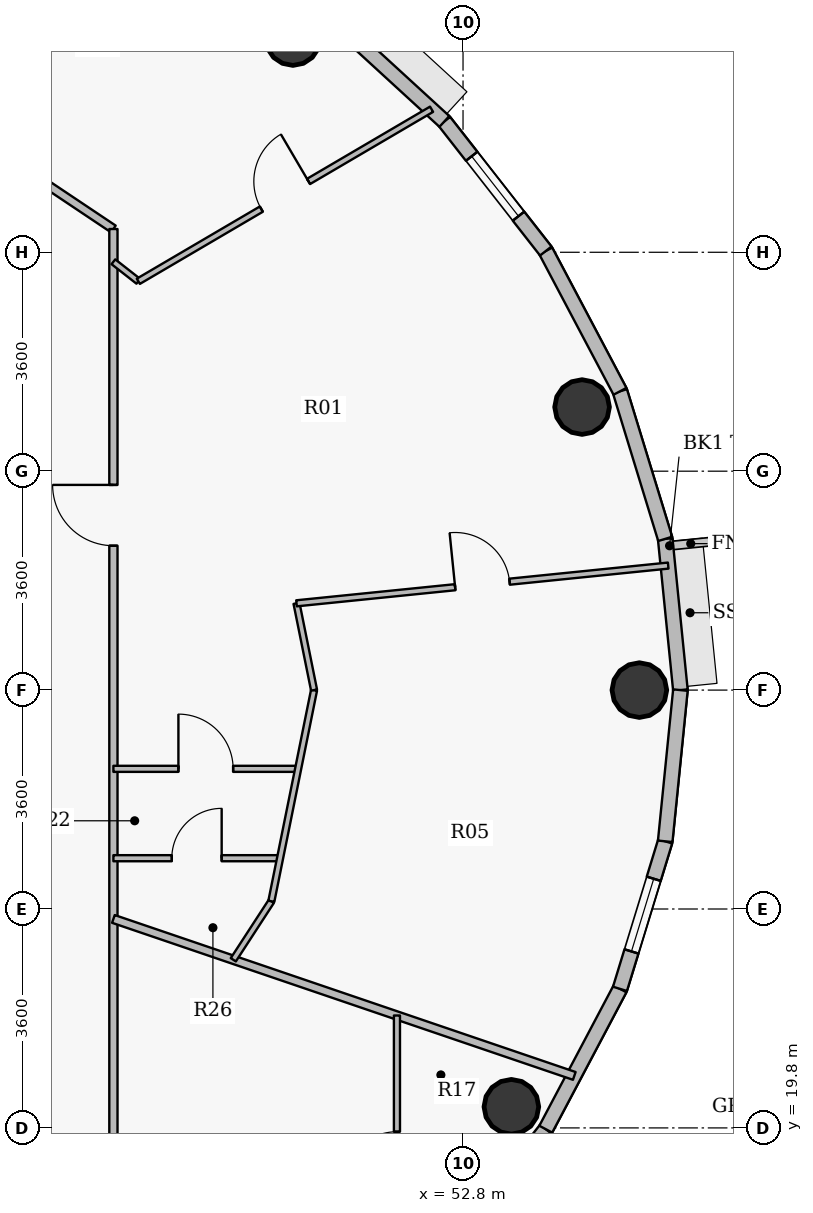
"""IFC4 building model, lengths in metres.
Left out: names, types, materials, properties, quantities, classifications, styles, units other than length and angle.
Written with IfcOpenShell. Run it as: python <this file> out.ifc"""

import sys

from ifc_helpers import new_model, si_unit, direction, frame, frame_2d, origin, origin_2d, place, context, subcontext, project, spatial, rectangle, hollow_circle, extrude, source, transform, mapped, element, fill, save


model = new_model("IFC4")
c1 = context("Model", 3, precision=1e-05, world=origin(), true_north=direction((0.0, 1.0)))
c2 = subcontext(c1, "Body", "Model", "MODEL_VIEW")
j1 = project(units=[si_unit("LENGTHUNIT", "METRE"), si_unit("PLANEANGLEUNIT", "RADIAN")], contexts=[c1])
p1 = place(None, origin())
s1 = spatial("IfcSite", under=j1, at=p1, CompositionType="ELEMENT")
p2 = place(p1, origin())
s2 = spatial("IfcBuilding", under=s1, at=p2, CompositionType="ELEMENT")
p3 = place(p2, frame((0.0, 0.0, 335.4)))
s3 = spatial("IfcBuildingStorey", under=s2, at=p3, CompositionType="ELEMENT", Elevation=335.4)
for number, where, z_axis, x_axis in (
    (1, (55.7, 27.0, 0.0), (0.0, 0.0, 1.0), (1.0, 0.0, 0.0)),
    (2, (54.758, 31.655, 0.0), (0.0, 0.0, 1.0), (1.0, 0.0, 0.0)),
    (3, (50.002, 37.723, 0.0), (0.0, 0.0, 1.0), (1.0, 0.0, 0.0)),
    (4, (53.595, 20.147, 0.0), (0.0, 0.0, 1.0), (1.0, 0.0, 0.0)),
):
    element("IfcColumn", number, at=place(p3, frame(where, z_axis=z_axis, x_axis=x_axis)), inside=s3, PredefinedType="COLUMN", context=c2, shape_type="SweptSolid", body=[
        extrude(hollow_circle(Radius=0.45, WallThickness=0.028, at=origin_2d()), origin(), (0.0, 0.0, 1.0), 3.8),
    ])
p4 = place(p3, frame((56.125, 29.487, 0.0), z_axis=(0.0, 0.0, 1.0), x_axis=(0.100025963401, -0.994984827344, 0.0)))
e5 = element("IfcWall", 5, at=p4, inside=s3, PredefinedType="SOLIDWALL", context=c2, shape_type="SweptSolid", body=[
    extrude(rectangle(XDim=2.499, YDim=0.24, at=frame_2d((1.25, 0.0))), origin(), (0.0, 0.0, 1.0), 3.55),
])
p5 = place(p3, frame((55.381, 31.913, 0.0), z_axis=(0.0, 0.0, 1.0), x_axis=(0.293105547213, -0.956080089842, 0.0)))
e6 = element("IfcWall", 6, at=p5, inside=s3, PredefinedType="SOLIDWALL", context=c2, shape_type="SweptSolid", body=[
    extrude(rectangle(XDim=2.538, YDim=0.24, at=frame_2d((1.269, 0.0))), origin(), (0.0, 0.0, 1.0), 2.035),
])
p6 = place(p3, frame((54.161, 34.221, 0.0), z_axis=(0.0, 0.0, 1.0), x_axis=(0.467487999989, -0.883999417345, 0.0)))
e7 = element("IfcWall", 7, at=p6, inside=s3, PredefinedType="SOLIDWALL", context=c2, shape_type="SweptSolid", body=[
    extrude(rectangle(XDim=2.61, YDim=0.24, at=frame_2d((1.305, 0.0))), origin(), (0.0, 0.0, 1.0), 2.035),
])
p7 = place(p3, frame((52.493, 36.352, 0.0), z_axis=(0.0, 0.0, 1.0), x_axis=(0.616286367698, -0.78752213492, 0.0)))
e8 = element("IfcWall", 8, at=p7, inside=s3, PredefinedType="SOLIDWALL", context=c2, shape_type="SweptSolid", body=[
    extrude(rectangle(XDim=2.706, YDim=0.24, at=frame_2d((1.353, 0.0))), origin(), (0.0, 0.0, 1.0), 3.55),
])
p8 = place(p7, frame((0.728, 0.0, 0.9)))
e9 = element("IfcOpeningElement", 9, at=p8, cuts=e8, PredefinedType="OPENING", context=c2, shape_type="SweptSolid", body=[
    extrude(rectangle(XDim=1.25, YDim=1.65, at=origin_2d()), frame((0.625, 0.13, 0.825), z_axis=(0.0, -1.0, 0.0), x_axis=(1.0, 0.0, 0.0)), (0.0, 0.0, 1.0), 0.26),
])
p9 = place(p3, frame((50.419, 38.254, 0.0), z_axis=(0.0, 0.0, 1.0), x_axis=(0.737020907932, -0.675869944051, 0.0)))
e10 = element("IfcWall", 10, at=p9, inside=s3, PredefinedType="SOLIDWALL", context=c2, shape_type="SweptSolid", body=[
    extrude(rectangle(XDim=2.815, YDim=0.24, at=frame_2d((1.407, 0.0))), origin(), (0.0, 0.0, 1.0), 3.55),
])
p10 = place(p3, frame((54.161, 19.779, 0.0), z_axis=(0.0, 0.0, 1.0), x_axis=(-0.616286367698, -0.78752213492, 0.0)))
e11 = element("IfcWall", 11, at=p10, inside=s3, PredefinedType="SOLIDWALL", context=c2, shape_type="SweptSolid", body=[
    extrude(rectangle(XDim=2.706, YDim=0.24, at=frame_2d((1.353, 0.0))), origin(), (0.0, 0.0, 1.0), 2.035),
])
p11 = place(p3, frame((55.381, 22.087, 0.0), z_axis=(0.0, 0.0, 1.0), x_axis=(-0.467487999989, -0.883999417345, 0.0)))
e12 = element("IfcWall", 12, at=p11, inside=s3, PredefinedType="SOLIDWALL", context=c2, shape_type="SweptSolid", body=[
    extrude(rectangle(XDim=2.61, YDim=0.24, at=frame_2d((1.305, 0.0))), origin(), (0.0, 0.0, 1.0), 2.035),
])
p12 = place(p3, frame((56.125, 24.513, 0.0), z_axis=(0.0, 0.0, 1.0), x_axis=(-0.293105547213, -0.956080089842, 0.0)))
e13 = element("IfcWall", 13, at=p12, inside=s3, PredefinedType="SOLIDWALL", context=c2, shape_type="SweptSolid", body=[
    extrude(rectangle(XDim=2.538, YDim=0.24, at=frame_2d((1.269, 0.0))), origin(), (0.0, 0.0, 1.0), 3.55),
])
p13 = place(p12, frame((0.644, 0.0, 0.9)))
e14 = element("IfcOpeningElement", 14, at=p13, cuts=e13, PredefinedType="OPENING", context=c2, shape_type="SweptSolid", body=[
    extrude(rectangle(XDim=1.25, YDim=1.65, at=origin_2d()), frame((0.625, 0.13, 0.825), z_axis=(0.0, -1.0, 0.0), x_axis=(1.0, 0.0, 0.0)), (0.0, 0.0, 1.0), 0.26),
])
p14 = place(p3, frame((56.375, 27.0, 0.0), z_axis=(0.0, 0.0, 1.0), x_axis=(-0.100025963401, -0.994984827344, 0.0)))
e15 = element("IfcWall", 15, at=p14, inside=s3, PredefinedType="SOLIDWALL", context=c2, shape_type="SweptSolid", body=[
    extrude(rectangle(XDim=2.499, YDim=0.24, at=frame_2d((1.25, 0.0))), origin(), (0.0, 0.0, 1.0), 3.55),
])
p15 = place(p3, frame((45.541, 35.592, 0.0), z_axis=(0.0, 0.0, 1.0), x_axis=(0.831180227396, -0.556003084151, 0.0)))
e16 = element("IfcWall", 16, at=p15, inside=s3, PredefinedType="PARTITIONING", context=c2, shape_type="SweptSolid", body=[
    extrude(rectangle(XDim=1.815, YDim=0.135, at=frame_2d((0.908, 0.0))), origin(), (0.0, 0.0, 1.0), 3.085),
])
p16 = place(p3, frame((47.05, 19.417, 0.0), z_axis=(0.0, 0.0, 1.0), x_axis=(0.0, 1.0, 0.0)))
e17 = element("IfcWall", 17, at=p16, inside=s3, PredefinedType="PARTITIONING", context=c2, shape_type="SweptSolid", body=[
    extrude(rectangle(XDim=15.165, YDim=0.135, at=frame_2d((7.583, 0.0))), origin(), (0.0, 0.0, 1.0), 2.25),
])
p17 = place(p16, frame((9.957, 0.0, 0.0)))
e18 = element("IfcOpeningElement", 18, at=p17, cuts=e17, PredefinedType="OPENING", context=c2, shape_type="SweptSolid", body=[
    extrude(rectangle(XDim=1.0, YDim=2.15, at=origin_2d()), frame((0.5, 0.078, 1.075), z_axis=(0.0, -1.0, 0.0), x_axis=(1.0, 0.0, 0.0)), (0.0, 0.0, 1.0), 0.155),
])
p18 = place(p3, frame((47.05, 23.237, 0.0), z_axis=(0.0, 0.0, 1.0), x_axis=(0.946614475353, -0.32236785673, 0.0)))
e19 = element("IfcWall", 19, at=p18, inside=s3, PredefinedType="PARTITIONING", context=c2, shape_type="SweptSolid", body=[
    extrude(rectangle(XDim=8.007, YDim=0.135, at=frame_2d((4.004, 0.0))), origin(), (0.0, 0.0, 1.0), 3.035),
])
p19 = place(p3, frame((47.05, 24.235, 0.0), z_axis=(0.0, 0.0, 1.0), x_axis=(1.0, 0.0, 0.0)))
e20 = element("IfcWall", 20, at=p19, inside=s3, PredefinedType="PARTITIONING", context=c2, shape_type="SweptSolid", body=[
    extrude(rectangle(XDim=2.741, YDim=0.1, at=frame_2d((1.37, 0.0))), origin(), (0.0, 0.0, 1.0), 3.55),
])
p20 = place(p19, frame((0.96, 0.0, 0.0)))
e21 = element("IfcOpeningElement", 21, at=p20, cuts=e20, PredefinedType="OPENING", context=c2, shape_type="SweptSolid", body=[
    extrude(rectangle(XDim=0.82, YDim=2.1, at=origin_2d()), frame((0.41, 0.06, 1.05), z_axis=(0.0, -1.0, 0.0), x_axis=(1.0, 0.0, 0.0)), (0.0, 0.0, 1.0), 0.12),
])
p21 = place(p3, frame((47.05, 25.705, 0.0), z_axis=(0.0, 0.0, 1.0), x_axis=(1.0, 0.0, 0.0)))
e22 = element("IfcWall", 22, at=p21, inside=s3, PredefinedType="PARTITIONING", context=c2, shape_type="SweptSolid", body=[
    extrude(rectangle(XDim=3.038, YDim=0.1, at=frame_2d((1.519, 0.0))), origin(), (0.0, 0.0, 1.0), 3.55),
])
p22 = place(p21, frame((1.069, 0.0, 0.0)))
e23 = element("IfcOpeningElement", 23, at=p22, cuts=e22, PredefinedType="OPENING", context=c2, shape_type="SweptSolid", body=[
    extrude(rectangle(XDim=0.9, YDim=2.1, at=origin_2d()), frame((0.45, 0.06, 1.05), z_axis=(0.0, -1.0, 0.0), x_axis=(1.0, 0.0, 0.0)), (0.0, 0.0, 1.0), 0.12),
])
p23 = place(p3, frame((47.05, 34.044, 0.0), z_axis=(0.0, 0.0, 1.0), x_axis=(0.787277370311, -0.616599012483, 0.0)))
e24 = element("IfcWall", 24, at=p23, inside=s3, PredefinedType="PARTITIONING", context=c2, shape_type="SweptSolid", body=[
    extrude(rectangle(XDim=0.521, YDim=0.1, at=frame_2d((0.26, 0.0))), origin(), (0.0, 0.0, 1.0), 3.55),
])
p24 = place(p3, frame((47.46, 33.723, 0.0), z_axis=(0.0, 0.0, 1.0), x_axis=(0.862533037069, 0.506000750952, 0.0)))
e25 = element("IfcWall", 25, at=p24, inside=s3, PredefinedType="PARTITIONING", context=c2, shape_type="SweptSolid", body=[
    extrude(rectangle(XDim=5.591, YDim=0.1, at=frame_2d((2.795, 0.0))), origin(), (0.0, 0.0, 1.0), 3.035),
])
p25 = place(p24, frame((2.345, 0.0, 0.0)))
e26 = element("IfcOpeningElement", 26, at=p25, cuts=e25, PredefinedType="OPENING", context=c2, shape_type="SweptSolid", body=[
    extrude(rectangle(XDim=0.9, YDim=2.1, at=origin_2d()), frame((0.45, 0.06, 1.05), z_axis=(0.0, -1.0, 0.0), x_axis=(1.0, 0.0, 0.0)), (0.0, 0.0, 1.0), 0.12),
])
p26 = place(p3, frame((49.022, 22.565, 0.0), z_axis=(0.0, 0.0, 1.0), x_axis=(0.545436909984, 0.838151881957, 0.0)))
e27 = element("IfcWall", 27, at=p26, inside=s3, PredefinedType="PARTITIONING", context=c2, shape_type="SweptSolid", body=[
    extrude(rectangle(XDim=1.148, YDim=0.1, at=frame_2d((0.574, 0.0))), origin(), (0.0, 0.0, 1.0), 3.55),
])
p27 = place(p3, frame((49.648, 23.527, 0.0), z_axis=(0.0, 0.0, 1.0), x_axis=(0.198249177906, 0.980151653296, 0.0)))
e28 = element("IfcWall", 28, at=p27, inside=s3, PredefinedType="PARTITIONING", context=c2, shape_type="SweptSolid", body=[
    extrude(rectangle(XDim=3.543, YDim=0.1, at=frame_2d((1.771, 0.0))), origin(), (0.0, 0.0, 1.0), 3.085),
])
p28 = place(p3, frame((50.061, 28.427, 0.0), z_axis=(0.0, 0.0, 1.0), x_axis=(0.198372931515, -0.980126614291, 0.0)))
e29 = element("IfcWall", 29, at=p28, inside=s3, PredefinedType="PARTITIONING", context=c2, shape_type="SweptSolid", body=[
    extrude(rectangle(XDim=1.456, YDim=0.1, at=frame_2d((0.728, 0.0))), origin(), (0.0, 0.0, 1.0), 3.085),
])
p29 = place(p3, frame((50.061, 28.427, 0.0), z_axis=(0.0, 0.0, 1.0), x_axis=(0.994890167578, 0.100963134143, 0.0)))
e30 = element("IfcWall", 30, at=p29, inside=s3, PredefinedType="PARTITIONING", context=c2, shape_type="SweptSolid", body=[
    extrude(rectangle(XDim=6.145, YDim=0.1, at=frame_2d((3.072, 0.0))), origin(), (0.0, 0.0, 1.0), 3.035),
])
p30 = place(p29, frame((2.622, 0.0, 0.0)))
e31 = element("IfcOpeningElement", 31, at=p30, cuts=e30, PredefinedType="OPENING", context=c2, shape_type="SweptSolid", body=[
    extrude(rectangle(XDim=0.9, YDim=2.1, at=origin_2d()), frame((0.45, 0.06, 1.05), z_axis=(0.0, -1.0, 0.0), x_axis=(1.0, 0.0, 0.0)), (0.0, 0.0, 1.0), 0.12),
])
p31 = place(p3, frame((51.713, 16.926, 0.0), z_axis=(0.0, 0.0, 1.0), x_axis=(0.0, 1.0, 0.0)))
e32 = element("IfcWall", 32, at=p31, inside=s3, PredefinedType="PARTITIONING", context=c2, shape_type="SweptSolid", body=[
    extrude(rectangle(XDim=4.722, YDim=0.1, at=frame_2d((2.361, 0.0))), origin(), (0.0, 0.0, 1.0), 2.25),
])
p32 = place(p31, frame((1.911, 0.0, 0.0)))
e33 = element("IfcOpeningElement", 33, at=p32, cuts=e32, PredefinedType="OPENING", context=c2, shape_type="SweptSolid", body=[
    extrude(rectangle(XDim=0.9, YDim=2.1, at=origin_2d()), frame((0.45, 0.06, 1.05), z_axis=(0.0, -1.0, 0.0), x_axis=(1.0, 0.0, 0.0)), (0.0, 0.0, 1.0), 0.12),
])
m1 = source(origin(), c2, "Body", "SweptSolid", [
    extrude(rectangle(XDim=1.25, YDim=1.65, at=origin_2d()), frame((0.625, 0.03, 0.825), z_axis=(0.0, -1.0, 0.0), x_axis=(1.0, 0.0, 0.0)), (0.0, 0.0, 1.0), 0.06),
])
p33 = place(p8, origin())
e34 = element("IfcWindow", 34, at=p33, inside=s3, PartitioningType="SINGLE_PANEL", PredefinedType="WINDOW", context=c2, shape_type="MappedRepresentation", body=[
    mapped(m1, transform((0.0, 0.0, 0.0), x_axis=(1.0, 0.0, 0.0), y_axis=(0.0, 1.0, 0.0), z_axis=(0.0, 0.0, 1.0), scale=1.0)),
])
fill(e9, e34)
p34 = place(p13, origin())
e35 = element("IfcWindow", 35, at=p34, inside=s3, PartitioningType="SINGLE_PANEL", PredefinedType="WINDOW", context=c2, shape_type="MappedRepresentation", body=[
    mapped(m1, transform((0.0, 0.0, 0.0), x_axis=(1.0, 0.0, 0.0), y_axis=(0.0, 1.0, 0.0), z_axis=(0.0, 0.0, 1.0), scale=1.0)),
])
fill(e14, e35)
m2 = source(origin(), c2, "Body", "SweptSolid", [
    extrude(rectangle(XDim=0.9, YDim=2.1, at=origin_2d()), frame((0.45, 0.025, 1.05), z_axis=(0.0, -1.0, 0.0), x_axis=(1.0, 0.0, 0.0)), (0.0, 0.0, 1.0), 0.05),
])
p35 = place(p32, origin())
e36 = element("IfcDoor", 36, at=p35, inside=s3, OperationType="SINGLE_SWING_LEFT", PredefinedType="DOOR", context=c2, shape_type="MappedRepresentation", body=[
    mapped(m2, transform((0.0, 0.0, 0.0), x_axis=(1.0, 0.0, 0.0), y_axis=(0.0, 1.0, 0.0), z_axis=(0.0, 0.0, 1.0), scale=1.0)),
])
fill(e33, e36)
m3 = source(origin(), c2, "Body", "SweptSolid", [
    extrude(rectangle(XDim=1.0, YDim=2.15, at=origin_2d()), frame((0.5, 0.025, 1.075), z_axis=(0.0, -1.0, 0.0), x_axis=(1.0, 0.0, 0.0)), (0.0, 0.0, 1.0), 0.05),
])
p36 = place(p17, origin())
e37 = element("IfcDoor", 37, at=p36, inside=s3, OperationType="SINGLE_SWING_RIGHT", PredefinedType="DOOR", context=c2, shape_type="MappedRepresentation", body=[
    mapped(m3, transform((0.0, 0.0, 0.0), x_axis=(1.0, 0.0, 0.0), y_axis=(0.0, 1.0, 0.0), z_axis=(0.0, 0.0, 1.0), scale=1.0)),
])
fill(e18, e37)
p37 = place(p30, origin())
e38 = element("IfcDoor", 38, at=p37, inside=s3, OperationType="SINGLE_SWING_LEFT", PredefinedType="DOOR", context=c2, shape_type="MappedRepresentation", body=[
    mapped(m2, transform((0.0, 0.0, 0.0), x_axis=(1.0, 0.0, 0.0), y_axis=(0.0, 1.0, 0.0), z_axis=(0.0, 0.0, 1.0), scale=1.0)),
])
fill(e31, e38)
p38 = place(p25, origin())
e39 = element("IfcDoor", 39, at=p38, inside=s3, OperationType="SINGLE_SWING_RIGHT", PredefinedType="DOOR", context=c2, shape_type="MappedRepresentation", body=[
    mapped(m2, transform((0.0, 0.0, 0.0), x_axis=(1.0, 0.0, 0.0), y_axis=(0.0, 1.0, 0.0), z_axis=(0.0, 0.0, 1.0), scale=1.0)),
])
fill(e26, e39)
p39 = place(p22, origin())
e40 = element("IfcDoor", 40, at=p39, inside=s3, OperationType="SINGLE_SWING_LEFT", PredefinedType="DOOR", context=c2, shape_type="MappedRepresentation", body=[
    mapped(m2, transform((0.0, 0.0, 0.0), x_axis=(1.0, 0.0, 0.0), y_axis=(0.0, 1.0, 0.0), z_axis=(0.0, 0.0, 1.0), scale=1.0)),
])
fill(e23, e40)
m4 = source(origin(), c2, "Body", "SweptSolid", [
    extrude(rectangle(XDim=0.82, YDim=2.1, at=origin_2d()), frame((0.41, 0.025, 1.05), z_axis=(0.0, -1.0, 0.0), x_axis=(1.0, 0.0, 0.0)), (0.0, 0.0, 1.0), 0.05),
])
p40 = place(p20, origin())
e41 = element("IfcDoor", 41, at=p40, inside=s3, OperationType="SINGLE_SWING_RIGHT", PredefinedType="DOOR", context=c2, shape_type="MappedRepresentation", body=[
    mapped(m4, transform((0.0, 0.0, 0.0), x_axis=(1.0, 0.0, 0.0), y_axis=(0.0, 1.0, 0.0), z_axis=(0.0, 0.0, 1.0), scale=1.0)),
])
fill(e21, e41)
save(model, sys.argv[1])
